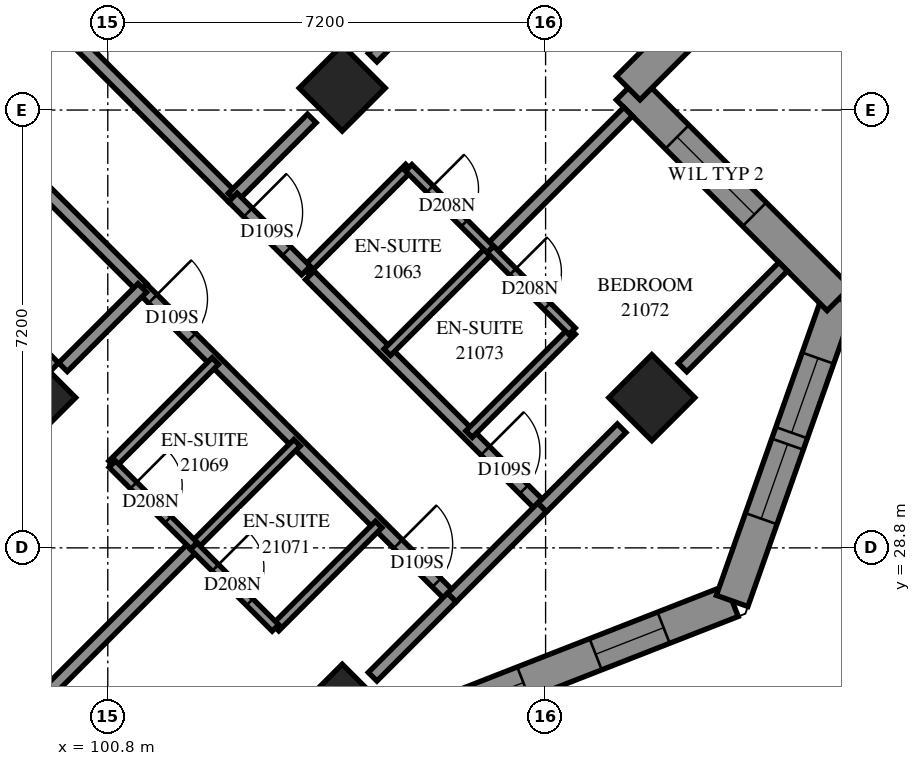
"""IFC4 building model, lengths in metres.
Left out: names, types, materials, properties, quantities, classifications, styles, units other than length and angle.
Written with IfcOpenShell. Run it as: python <this file> out.ifc"""

import sys

from ifc_helpers import new_model, si_unit, direction, frame, frame_2d, origin, origin_2d, place, context, subcontext, project, spatial, polyline, rectangle, outline, extrude, element, fill, save


model = new_model("IFC4")
c1 = context("Model", 3, precision=1e-05, world=origin(), true_north=direction((0.0, 1.0)))
c2 = subcontext(c1, "Body", "Model", "MODEL_VIEW")
j1 = project(units=[si_unit("LENGTHUNIT", "METRE"), si_unit("PLANEANGLEUNIT", "RADIAN")], contexts=[c1])
p1 = place(None, origin())
s1 = spatial("IfcSite", under=j1, at=p1, CompositionType="ELEMENT")
p2 = place(p1, origin())
s2 = spatial("IfcBuilding", under=s1, at=p2, CompositionType="ELEMENT")
p3 = place(p2, frame((0.0, 0.0, 81.2)))
s3 = spatial("IfcBuildingStorey", under=s2, at=p3, CompositionType="ELEMENT", Elevation=81.2)
for number, where, z_axis, x_axis in (
    (1, (104.656, 36.362, 0.0), (0.0, 0.0, 1.0), (0.707, -0.707, 0.0)),
    (2, (99.565, 31.271, 0.0), (0.0, 0.0, 1.0), (0.707, -0.707, 0.0)),
    (3, (109.747, 31.271, 0.0), (0.0, 0.0, 1.0), (0.707, -0.707, 0.0)),
    (4, (104.656, 26.18, 0.0), (0.0, 0.0, 1.0), (0.707, -0.707, 0.0)),
):
    element("IfcColumn", number, at=place(p3, frame(where, z_axis=z_axis, x_axis=x_axis)), inside=s3, PredefinedType="COLUMN", context=c2, shape_type="SweptSolid", body=[
        extrude(rectangle(XDim=1.0, YDim=1.0, at=origin_2d()), origin(), (0.0, 0.0, 1.0), 3.1),
    ])
p4 = place(p3, frame((105.964, 25.932, 0.0), z_axis=(0.0, 0.0, 1.0), x_axis=(0.9313442446, 0.3641399428, 0.0)))
e5 = element("IfcWall", 5, at=p4, inside=s3, PredefinedType="SOLIDWALL", context=c2, shape_type="SweptSolid", body=[
    extrude(outline(polyline([(0.12, -0.275), (5.606, -0.275), (5.354, 0.275), (-0.12, 0.275), (0.12, -0.275)])), origin(), (0.0, 0.0, 1.0), 3.1),
])
p5 = place(p4, frame((0.593, 0.0, 0.5)))
e6 = element("IfcOpeningElement", 6, at=p5, cuts=e5, PredefinedType="OPENING", context=c2, shape_type="SweptSolid", body=[
    extrude(rectangle(XDim=1.2, YDim=2.45, at=frame_2d((0.6, 1.225))), frame((0.0, 0.285, 0.0), z_axis=(0.0, -1.0, 0.0), x_axis=(1.0, 0.0, 0.0)), (0.0, 0.0, 1.0), 0.57),
])
p6 = place(p4, frame((3.07, 0.0, 0.5)))
e7 = element("IfcOpeningElement", 7, at=p6, cuts=e5, PredefinedType="OPENING", context=c2, shape_type="SweptSolid", body=[
    extrude(rectangle(XDim=1.2, YDim=2.45, at=frame_2d((0.6, 1.225))), frame((0.0, 0.285, 0.0), z_axis=(0.0, -1.0, 0.0), x_axis=(1.0, 0.0, 0.0)), (0.0, 0.0, 1.0), 0.57),
])
p7 = place(p3, frame((111.068, 27.928, 0.0), z_axis=(0.0, 0.0, 1.0), x_axis=(0.3333124239, 0.9428164339, 0.0)))
e8 = element("IfcWall", 8, at=p7, inside=s3, PredefinedType="SOLIDWALL", context=c2, shape_type="SweptSolid", body=[
    extrude(outline(polyline([(-0.126, -0.275), (5.443, -0.275), (5.096, 0.275), (0.126, 0.275), (-0.126, -0.275)])), origin(), (0.0, 0.0, 1.0), 3.1),
])
p8 = place(p7, frame((1.434, 0.0, 0.5)))
e9 = element("IfcOpeningElement", 9, at=p8, cuts=e8, PredefinedType="OPENING", context=c2, shape_type="SweptSolid", body=[
    extrude(rectangle(XDim=1.3, YDim=2.45, at=frame_2d((0.65, 1.225))), frame((0.0, 0.285, 0.0), z_axis=(0.0, -1.0, 0.0), x_axis=(1.0, 0.0, 0.0)), (0.0, 0.0, 1.0), 0.57),
])
p9 = place(p7, frame((2.934, 0.0, 0.5)))
e10 = element("IfcOpeningElement", 10, at=p9, cuts=e8, PredefinedType="OPENING", context=c2, shape_type="SweptSolid", body=[
    extrude(rectangle(XDim=1.3, YDim=2.45, at=frame_2d((0.65, 1.225))), frame((0.0, 0.285, 0.0), z_axis=(0.0, -1.0, 0.0), x_axis=(1.0, 0.0, 0.0)), (0.0, 0.0, 1.0), 0.57),
])
p10 = place(p3, frame((112.824, 32.896, 0.0), z_axis=(0.0, 0.0, 1.0), x_axis=(-0.7071067812, 0.7071067812, 0.0)))
e11 = element("IfcWall", 11, at=p10, inside=s3, PredefinedType="SOLIDWALL", context=c2, shape_type="SweptSolid", body=[
    extrude(outline(polyline([(-0.173, -0.275), (4.627, -0.275), (5.177, 0.275), (0.173, 0.275), (-0.173, -0.275)])), origin(), (0.0, 0.0, 1.0), 3.1),
])
p11 = place(p10, frame((1.964, 0.0, 0.6)))
e12 = element("IfcOpeningElement", 12, at=p11, cuts=e11, PredefinedType="OPENING", context=c2, shape_type="SweptSolid", body=[
    extrude(rectangle(XDim=1.8, YDim=1.9, at=frame_2d((0.9, 0.95))), frame((0.0, 0.285, 0.0), z_axis=(0.0, -1.0, 0.0), x_axis=(1.0, 0.0, 0.0)), (0.0, 0.0, 1.0), 0.57),
])
p12 = place(p3, frame((109.358, 36.362, 0.0), z_axis=(0.0, 0.0, 1.0), x_axis=(0.7071067812, 0.7071067812, 0.0)))
e13 = element("IfcWall", 13, at=p12, inside=s3, PredefinedType="SOLIDWALL", context=c2, shape_type="SweptSolid", body=[
    extrude(outline(polyline([(0.275, -0.275), (5.975, -0.275), (5.261, 0.275), (-0.275, 0.275), (0.275, -0.275)])), origin(), (0.0, 0.0, 1.0), 3.1),
])
p13 = place(p12, frame((1.137, 0.0, 0.6)))
e14 = element("IfcOpeningElement", 14, at=p13, cuts=e13, PredefinedType="OPENING", context=c2, shape_type="SweptSolid", body=[
    extrude(rectangle(XDim=1.8, YDim=1.9, at=frame_2d((0.9, 0.95))), frame((0.0, 0.285, 0.0), z_axis=(0.0, -1.0, 0.0), x_axis=(1.0, 0.0, 0.0)), (0.0, 0.0, 1.0), 0.57),
])
p14 = place(p3, frame((96.518, 23.127, 0.0), z_axis=(0.0, 0.0, 1.0), x_axis=(0.7069765458, 0.7072369926, 0.0)))
e15 = element("IfcWall", 15, at=p14, inside=s3, PredefinedType="PARTITIONING", context=c2, shape_type="SweptSolid", body=[
    extrude(rectangle(XDim=8.063, YDim=0.2, at=frame_2d((4.032, 0.0))), origin(), (0.0, 0.0, 1.0), 3.1),
])
p15 = place(p3, frame((101.365, 33.071, 0.0), z_axis=(0.0, 0.0, 1.0), x_axis=(0.7071067812, -0.7071067812, 0.0)))
e16 = element("IfcWall", 16, at=p15, inside=s3, PredefinedType="PARTITIONING", context=c2, shape_type="SweptSolid", body=[
    extrude(rectangle(XDim=7.2, YDim=0.2, at=frame_2d((3.6, 0.0))), origin(), (0.0, 0.0, 1.0), 3.1),
])
p16 = place(p15, frame((0.248, 0.0, 0.0)))
e17 = element("IfcOpeningElement", 17, at=p16, cuts=e16, PredefinedType="OPENING", context=c2, shape_type="SweptSolid", body=[
    extrude(rectangle(XDim=0.9, YDim=2.1, at=frame_2d((0.45, 1.05))), frame((0.0, 0.11, 0.0), z_axis=(0.0, -1.0, 0.0), x_axis=(1.0, 0.0, 0.0)), (0.0, 0.0, 1.0), 0.22),
])
p17 = place(p15, frame((5.95, 0.0, 0.0)))
e18 = element("IfcOpeningElement", 18, at=p17, cuts=e16, PredefinedType="OPENING", context=c2, shape_type="SweptSolid", body=[
    extrude(rectangle(XDim=0.9, YDim=2.1, at=frame_2d((0.45, 1.05))), frame((0.0, 0.11, 0.0), z_axis=(0.0, -1.0, 0.0), x_axis=(1.0, 0.0, 0.0)), (0.0, 0.0, 1.0), 0.22),
])
p18 = place(p3, frame((105.155, 36.863, 0.0), z_axis=(0.0, 0.0, 1.0), x_axis=(0.7071067812, 0.7071067812, 0.0)))
e19 = element("IfcWall", 19, at=p18, inside=s3, PredefinedType="PARTITIONING", context=c2, shape_type="SweptSolid", body=[
    extrude(rectangle(XDim=5.787, YDim=0.2, at=frame_2d((2.893, 0.0))), origin(), (0.0, 0.0, 1.0), 3.1),
])
p19 = place(p3, frame((104.123, 33.282, 0.0), z_axis=(0.0, 0.0, 1.0), x_axis=(0.7071067812, -0.7071067812, 0.0)))
e20 = element("IfcWall", 20, at=p19, inside=s3, PredefinedType="PARTITIONING", context=c2, shape_type="SweptSolid", body=[
    extrude(rectangle(XDim=5.399, YDim=0.2, at=frame_2d((2.7, 0.0))), origin(), (0.0, 0.0, 1.0), 3.1),
])
p20 = place(p19, frame((4.08, 0.0, 0.0)))
e21 = element("IfcOpeningElement", 21, at=p20, cuts=e20, PredefinedType="OPENING", context=c2, shape_type="SweptSolid", body=[
    extrude(rectangle(XDim=0.9, YDim=2.1, at=frame_2d((0.45, 1.05))), frame((0.0, 0.11, 0.0), z_axis=(0.0, -1.0, 0.0), x_axis=(1.0, 0.0, 0.0)), (0.0, 0.0, 1.0), 0.22),
])
p21 = place(p3, frame((98.469, 35.973, 0.0), z_axis=(0.0, 0.0, 1.0), x_axis=(0.7073506531, -0.7068628251, 0.0)))
e22 = element("IfcWall", 22, at=p21, inside=s3, PredefinedType="PARTITIONING", context=c2, shape_type="SweptSolid", body=[
    extrude(rectangle(XDim=4.1, YDim=0.2, at=frame_2d((2.05, 0.0))), origin(), (0.0, 0.0, 1.0), 3.1),
])
p22 = place(p21, frame((0.457, 0.0, 0.0)))
e23 = element("IfcOpeningElement", 23, at=p22, cuts=e22, PredefinedType="OPENING", context=c2, shape_type="SweptSolid", body=[
    extrude(rectangle(XDim=1.0, YDim=2.1, at=frame_2d((0.5, 1.05))), frame((0.0, 0.11, 0.0), z_axis=(0.0, -1.0, 0.0), x_axis=(1.0, 0.0, 0.0)), (0.0, 0.0, 1.0), 0.22),
])
p23 = place(p3, frame((100.31, 37.106, 0.0), z_axis=(0.0, 0.0, 1.0), x_axis=(0.7073845681, -0.7068288851, 0.0)))
e24 = element("IfcWall", 24, at=p23, inside=s3, PredefinedType="PARTITIONING", context=c2, shape_type="SweptSolid", body=[
    extrude(rectangle(XDim=3.599, YDim=0.2, at=frame_2d((1.8, 0.0))), origin(), (0.0, 0.0, 1.0), 3.1),
])
p24 = place(p3, frame((107.095, 33.711, 0.0), z_axis=(0.0, 0.0, 1.0), x_axis=(0.7071067812, 0.7071067812, 0.0)))
e25 = element("IfcWall", 25, at=p24, inside=s3, PredefinedType="PARTITIONING", context=c2, shape_type="SweptSolid", body=[
    extrude(rectangle(XDim=3.2, YDim=0.2, at=frame_2d((1.6, 0.0))), origin(), (0.0, 0.0, 1.0), 3.1),
])
p25 = place(p3, frame((100.871, 30.175, 0.0), z_axis=(0.0, 0.0, 1.0), x_axis=(0.7071067812, 0.7071067812, 0.0)))
e26 = element("IfcWall", 26, at=p25, inside=s3, PredefinedType="PARTITIONING", context=c2, shape_type="SweptSolid", body=[
    extrude(rectangle(XDim=2.401, YDim=0.15, at=frame_2d((1.201, 0.0))), origin(), (0.0, 0.0, 1.0), 3.1),
])
p26 = place(p3, frame((105.396, 32.016, 0.0), z_axis=(0.0, 0.0, 1.0), x_axis=(0.7075233388, 0.706689978, 0.0)))
e27 = element("IfcWall", 27, at=p26, inside=s3, PredefinedType="PARTITIONING", context=c2, shape_type="SweptSolid", body=[
    extrude(rectangle(XDim=2.4, YDim=0.15, at=frame_2d((1.2, 0.0))), origin(), (0.0, 0.0, 1.0), 3.1),
])
for number, where, z_axis, x_axis in (
    (28, (102.216, 28.832, 0.0), (0.0, 0.0, 1.0), (0.707, 0.707, 0.0)),
    (29, (104.055, 33.359, 0.0), (0.0, 0.0, 1.0), (0.707, 0.707, 0.0)),
    (30, (103.559, 27.489, 0.0), (0.0, 0.0, 1.0), (0.707, 0.707, 0.0)),
    (31, (106.741, 30.671, 0.0), (0.0, 0.0, 1.0), (0.707, 0.707, 0.0)),
):
    element("IfcWall", number, at=place(p3, frame(where, z_axis=z_axis, x_axis=x_axis)), inside=s3, PredefinedType="PARTITIONING", context=c2, shape_type="SweptSolid", body=[
        extrude(rectangle(XDim=2.398, YDim=0.15, at=frame_2d((1.199, 0.0))), origin(), (0.0, 0.0, 1.0), 3.1),
    ])
p27 = place(p3, frame((110.251, 31.767, 0.0), z_axis=(0.0, 0.0, 1.0), x_axis=(0.7066584143, 0.7075548639, 0.0)))
e32 = element("IfcWall", 32, at=p27, inside=s3, PredefinedType="PARTITIONING", context=c2, shape_type="SweptSolid", body=[
    extrude(rectangle(XDim=2.343, YDim=0.2, at=frame_2d((1.171, 0.0))), origin(), (0.0, 0.0, 1.0), 3.1),
])
p28 = place(p3, frame((106.457, 27.983, 0.0), z_axis=(0.0, 0.0, 1.0), x_axis=(0.7071067812, 0.7071067812, 0.0)))
e33 = element("IfcWall", 33, at=p28, inside=s3, PredefinedType="PARTITIONING", context=c2, shape_type="SweptSolid", body=[
    extrude(rectangle(XDim=2.102, YDim=0.2, at=frame_2d((1.051, 0.0))), origin(), (0.0, 0.0, 1.0), 2.6),
])
p29 = place(p3, frame((105.749, 35.051, 0.0), z_axis=(0.0, 0.0, 1.0), x_axis=(0.7071067812, -0.7071067812, 0.0)))
e34 = element("IfcWall", 34, at=p29, inside=s3, PredefinedType="PARTITIONING", context=c2, shape_type="SweptSolid", body=[
    extrude(rectangle(XDim=1.901, YDim=0.15, at=frame_2d((0.95, 0.0))), origin(), (0.0, 0.0, 1.0), 3.1),
])
p30 = place(p29, frame((0.493, 0.0, 0.0)))
e35 = element("IfcOpeningElement", 35, at=p30, cuts=e34, PredefinedType="OPENING", context=c2, shape_type="SweptSolid", body=[
    extrude(rectangle(XDim=0.8, YDim=2.1, at=frame_2d((0.4, 1.05))), frame((0.0, 0.085, 0.0), z_axis=(0.0, -1.0, 0.0), x_axis=(1.0, 0.0, 0.0)), (0.0, 0.0, 1.0), 0.17),
])
p31 = place(p3, frame((100.875, 30.177, 0.0), z_axis=(0.0, 0.0, 1.0), x_axis=(0.7076330979, -0.7065800724, 0.0)))
e36 = element("IfcWall", 36, at=p31, inside=s3, PredefinedType="PARTITIONING", context=c2, shape_type="SweptSolid", body=[
    extrude(rectangle(XDim=1.899, YDim=0.15, at=frame_2d((0.95, 0.0))), origin(), (0.0, 0.0, 1.0), 3.1),
])
p32 = place(p31, frame((0.493, 0.0, 0.0)))
e37 = element("IfcOpeningElement", 37, at=p32, cuts=e36, PredefinedType="OPENING", context=c2, shape_type="SweptSolid", body=[
    extrude(rectangle(XDim=0.8, YDim=2.1, at=frame_2d((0.4, 1.05))), frame((0.0, 0.085, 0.0), z_axis=(0.0, -1.0, 0.0), x_axis=(1.0, 0.0, 0.0)), (0.0, 0.0, 1.0), 0.17),
])
p33 = place(p3, frame((107.094, 33.708, 0.0), z_axis=(0.0, 0.0, 1.0), x_axis=(0.7065800724, -0.7076330979, 0.0)))
e38 = element("IfcWall", 38, at=p33, inside=s3, PredefinedType="PARTITIONING", context=c2, shape_type="SweptSolid", body=[
    extrude(rectangle(XDim=1.899, YDim=0.15, at=frame_2d((0.95, 0.0))), origin(), (0.0, 0.0, 1.0), 3.1),
])
p34 = place(p33, frame((0.519, 0.0, 0.0)))
e39 = element("IfcOpeningElement", 39, at=p34, cuts=e38, PredefinedType="OPENING", context=c2, shape_type="SweptSolid", body=[
    extrude(rectangle(XDim=0.8, YDim=2.1, at=frame_2d((0.4, 1.05))), frame((0.0, 0.085, 0.0), z_axis=(0.0, -1.0, 0.0), x_axis=(1.0, 0.0, 0.0)), (0.0, 0.0, 1.0), 0.17),
])
p35 = place(p3, frame((102.215, 28.826, 0.0), z_axis=(0.0, 0.0, 1.0), x_axis=(0.7071067812, -0.7071067812, 0.0)))
e40 = element("IfcWall", 40, at=p35, inside=s3, PredefinedType="PARTITIONING", context=c2, shape_type="SweptSolid", body=[
    extrude(rectangle(XDim=1.898, YDim=0.15, at=frame_2d((0.949, 0.0))), origin(), (0.0, 0.0, 1.0), 3.1),
])
p36 = place(p35, frame((0.5, 0.0, 0.0)))
e41 = element("IfcOpeningElement", 41, at=p36, cuts=e40, PredefinedType="OPENING", context=c2, shape_type="SweptSolid", body=[
    extrude(rectangle(XDim=0.8, YDim=2.1, at=frame_2d((0.4, 1.05))), frame((0.0, 0.085, 0.0), z_axis=(0.0, -1.0, 0.0), x_axis=(1.0, 0.0, 0.0)), (0.0, 0.0, 1.0), 0.17),
])
p37 = place(p3, frame((100.063, 31.771, 0.0), z_axis=(0.0, 0.0, 1.0), x_axis=(0.7071067812, 0.7071067812, 0.0)))
e42 = element("IfcWall", 42, at=p37, inside=s3, PredefinedType="PARTITIONING", context=c2, shape_type="SweptSolid", body=[
    extrude(rectangle(XDim=1.844, YDim=0.2, at=frame_2d((0.922, 0.0))), origin(), (0.0, 0.0, 1.0), 3.1),
])
p38 = place(p3, frame((107.947, 29.465, 0.0), z_axis=(0.0, 0.0, 1.0), x_axis=(0.7076492487, 0.7065638971, 0.0)))
e43 = element("IfcWall", 43, at=p38, inside=s3, PredefinedType="PARTITIONING", context=c2, shape_type="SweptSolid", body=[
    extrude(rectangle(XDim=1.843, YDim=0.2, at=frame_2d((0.921, 0.0))), origin(), (0.0, 0.0, 1.0), 2.6),
])
p39 = place(p3, frame((102.853, 34.561, 0.0), z_axis=(0.0, 0.0, 1.0), x_axis=(0.7071067812, 0.7071067812, 0.0)))
e44 = element("IfcWall", 44, at=p39, inside=s3, PredefinedType="PARTITIONING", context=c2, shape_type="SweptSolid", body=[
    extrude(rectangle(XDim=1.841, YDim=0.2, at=frame_2d((0.921, 0.0))), origin(), (0.0, 0.0, 1.0), 3.1),
])
p40 = place(p3, frame((105.155, 26.681, 0.0), z_axis=(0.0, 0.0, 1.0), x_axis=(0.7071067812, 0.7071067812, 0.0)))
e45 = element("IfcWall", 45, at=p40, inside=s3, PredefinedType="PARTITIONING", context=c2, shape_type="SweptSolid", body=[
    extrude(rectangle(XDim=1.841, YDim=0.2, at=frame_2d((0.921, 0.0))), origin(), (0.0, 0.0, 1.0), 2.6),
])
p41 = place(p3, frame((102.857, 34.563, 0.0), z_axis=(0.0, 0.0, 1.0), x_axis=(0.7071067812, -0.7071067812, 0.0)))
e46 = element("IfcWall", 46, at=p41, inside=s3, PredefinedType="PARTITIONING", context=c2, shape_type="SweptSolid", body=[
    extrude(rectangle(XDim=1.7, YDim=0.2, at=frame_2d((0.85, 0.0))), origin(), (0.0, 0.0, 1.0), 3.1),
])
p42 = place(p41, frame((0.35, 0.0, 0.0)))
e47 = element("IfcOpeningElement", 47, at=p42, cuts=e46, PredefinedType="OPENING", context=c2, shape_type="SweptSolid", body=[
    extrude(rectangle(XDim=0.9, YDim=2.1, at=frame_2d((0.45, 1.05))), frame((0.0, 0.11, 0.0), z_axis=(0.0, -1.0, 0.0), x_axis=(1.0, 0.0, 0.0)), (0.0, 0.0, 1.0), 0.22),
])
p43 = place(p3, frame((99.569, 32.123, 0.0), z_axis=(0.0, 0.0, 1.0), x_axis=(0.7071067812, -0.7071067812, 0.0)))
e48 = element("IfcWall", 48, at=p43, inside=s3, PredefinedType="PARTITIONING", context=c2, shape_type="SweptSolid", body=[
    extrude(rectangle(XDim=0.498, YDim=0.2, at=frame_2d((0.249, 0.0))), origin(), (0.0, 0.0, 1.0), 3.1),
])
p44 = place(p5, origin())
e49 = element("IfcWindow", 49, at=p44, inside=s3, PartitioningType="SINGLE_PANEL", PredefinedType="WINDOW", context=c2, shape_type="SweptSolid", body=[
    extrude(rectangle(XDim=1.2, YDim=2.45, at=frame_2d((0.6, 1.225))), frame((0.0, 0.155, 0.0), z_axis=(0.0, -1.0, 0.0), x_axis=(1.0, 0.0, 0.0)), (0.0, 0.0, 1.0), 0.06),
])
fill(e6, e49)
p45 = place(p6, origin())
e50 = element("IfcWindow", 50, at=p45, inside=s3, PartitioningType="SINGLE_PANEL", PredefinedType="WINDOW", context=c2, shape_type="SweptSolid", body=[
    extrude(rectangle(XDim=1.2, YDim=2.45, at=frame_2d((0.6, 1.225))), frame((0.0, 0.155, 0.0), z_axis=(0.0, -1.0, 0.0), x_axis=(1.0, 0.0, 0.0)), (0.0, 0.0, 1.0), 0.06),
])
fill(e7, e50)
p46 = place(p8, origin())
e51 = element("IfcWindow", 51, at=p46, inside=s3, PartitioningType="SINGLE_PANEL", PredefinedType="WINDOW", context=c2, shape_type="SweptSolid", body=[
    extrude(rectangle(XDim=1.3, YDim=2.45, at=frame_2d((0.65, 1.225))), frame((0.0, 0.155, 0.0), z_axis=(0.0, -1.0, 0.0), x_axis=(1.0, 0.0, 0.0)), (0.0, 0.0, 1.0), 0.06),
])
fill(e9, e51)
p47 = place(p9, origin())
e52 = element("IfcWindow", 52, at=p47, inside=s3, PartitioningType="SINGLE_PANEL", PredefinedType="WINDOW", context=c2, shape_type="SweptSolid", body=[
    extrude(rectangle(XDim=1.3, YDim=2.45, at=frame_2d((0.65, 1.225))), frame((0.0, 0.155, 0.0), z_axis=(0.0, -1.0, 0.0), x_axis=(1.0, 0.0, 0.0)), (0.0, 0.0, 1.0), 0.06),
])
fill(e10, e52)
p48 = place(p11, origin())
e53 = element("IfcWindow", 53, at=p48, inside=s3, PartitioningType="SINGLE_PANEL", PredefinedType="WINDOW", context=c2, shape_type="SweptSolid", body=[
    extrude(rectangle(XDim=1.8, YDim=1.9, at=frame_2d((0.9, 0.95))), frame((0.0, 0.155, 0.0), z_axis=(0.0, -1.0, 0.0), x_axis=(1.0, 0.0, 0.0)), (0.0, 0.0, 1.0), 0.06),
])
fill(e12, e53)
p49 = place(p42, origin())
e54 = element("IfcDoor", 54, at=p49, inside=s3, OperationType="SINGLE_SWING_LEFT", PredefinedType="DOOR", context=c2, shape_type="SweptSolid", body=[
    extrude(rectangle(XDim=0.9, YDim=2.1, at=frame_2d((0.45, 1.05))), frame((0.0, 0.025, 0.0), z_axis=(0.0, -1.0, 0.0), x_axis=(1.0, 0.0, 0.0)), (0.0, 0.0, 1.0), 0.05),
])
fill(e47, e54)
p50 = place(p30, origin())
e55 = element("IfcDoor", 55, at=p50, inside=s3, OperationType="SINGLE_SWING_RIGHT", PredefinedType="DOOR", context=c2, shape_type="SweptSolid", body=[
    extrude(rectangle(XDim=0.8, YDim=2.1, at=frame_2d((0.4, 1.05))), frame((0.0, 0.025, 0.0), z_axis=(0.0, -1.0, 0.0), x_axis=(1.0, 0.0, 0.0)), (0.0, 0.0, 1.0), 0.05),
])
fill(e35, e55)
p51 = place(p16, origin())
e56 = element("IfcDoor", 56, at=p51, inside=s3, OperationType="SINGLE_SWING_RIGHT", PredefinedType="DOOR", context=c2, shape_type="SweptSolid", body=[
    extrude(rectangle(XDim=0.9, YDim=2.1, at=frame_2d((0.45, 1.05))), frame((0.0, 0.025, 0.0), z_axis=(0.0, -1.0, 0.0), x_axis=(1.0, 0.0, 0.0)), (0.0, 0.0, 1.0), 0.05),
])
fill(e17, e56)
p52 = place(p32, origin())
e57 = element("IfcDoor", 57, at=p52, inside=s3, OperationType="SINGLE_SWING_RIGHT", PredefinedType="DOOR", context=c2, shape_type="SweptSolid", body=[
    extrude(rectangle(XDim=0.8, YDim=2.1, at=frame_2d((0.4, 1.05))), frame((0.0, 0.025, 0.0), z_axis=(0.0, -1.0, 0.0), x_axis=(1.0, 0.0, 0.0)), (0.0, 0.0, 1.0), 0.05),
])
fill(e37, e57)
p53 = place(p17, origin())
e58 = element("IfcDoor", 58, at=p53, inside=s3, OperationType="SINGLE_SWING_LEFT", PredefinedType="DOOR", context=c2, shape_type="SweptSolid", body=[
    extrude(rectangle(XDim=0.9, YDim=2.1, at=frame_2d((0.45, 1.05))), frame((0.0, 0.025, 0.0), z_axis=(0.0, -1.0, 0.0), x_axis=(1.0, 0.0, 0.0)), (0.0, 0.0, 1.0), 0.05),
])
fill(e18, e58)
p54 = place(p36, origin())
e59 = element("IfcDoor", 59, at=p54, inside=s3, OperationType="SINGLE_SWING_RIGHT", PredefinedType="DOOR", context=c2, shape_type="SweptSolid", body=[
    extrude(rectangle(XDim=0.8, YDim=2.1, at=frame_2d((0.4, 1.05))), frame((0.0, 0.025, 0.0), z_axis=(0.0, -1.0, 0.0), x_axis=(1.0, 0.0, 0.0)), (0.0, 0.0, 1.0), 0.05),
])
fill(e41, e59)
p55 = place(p20, origin())
e60 = element("IfcDoor", 60, at=p55, inside=s3, OperationType="SINGLE_SWING_RIGHT", PredefinedType="DOOR", context=c2, shape_type="SweptSolid", body=[
    extrude(rectangle(XDim=0.9, YDim=2.1, at=frame_2d((0.45, 1.05))), frame((0.0, 0.025, 0.0), z_axis=(0.0, -1.0, 0.0), x_axis=(1.0, 0.0, 0.0)), (0.0, 0.0, 1.0), 0.05),
])
fill(e21, e60)
p56 = place(p34, origin())
e61 = element("IfcDoor", 61, at=p56, inside=s3, OperationType="SINGLE_SWING_RIGHT", PredefinedType="DOOR", context=c2, shape_type="SweptSolid", body=[
    extrude(rectangle(XDim=0.8, YDim=2.1, at=frame_2d((0.4, 1.05))), frame((0.0, 0.025, 0.0), z_axis=(0.0, -1.0, 0.0), x_axis=(1.0, 0.0, 0.0)), (0.0, 0.0, 1.0), 0.05),
])
fill(e39, e61)
save(model, sys.argv[1])
